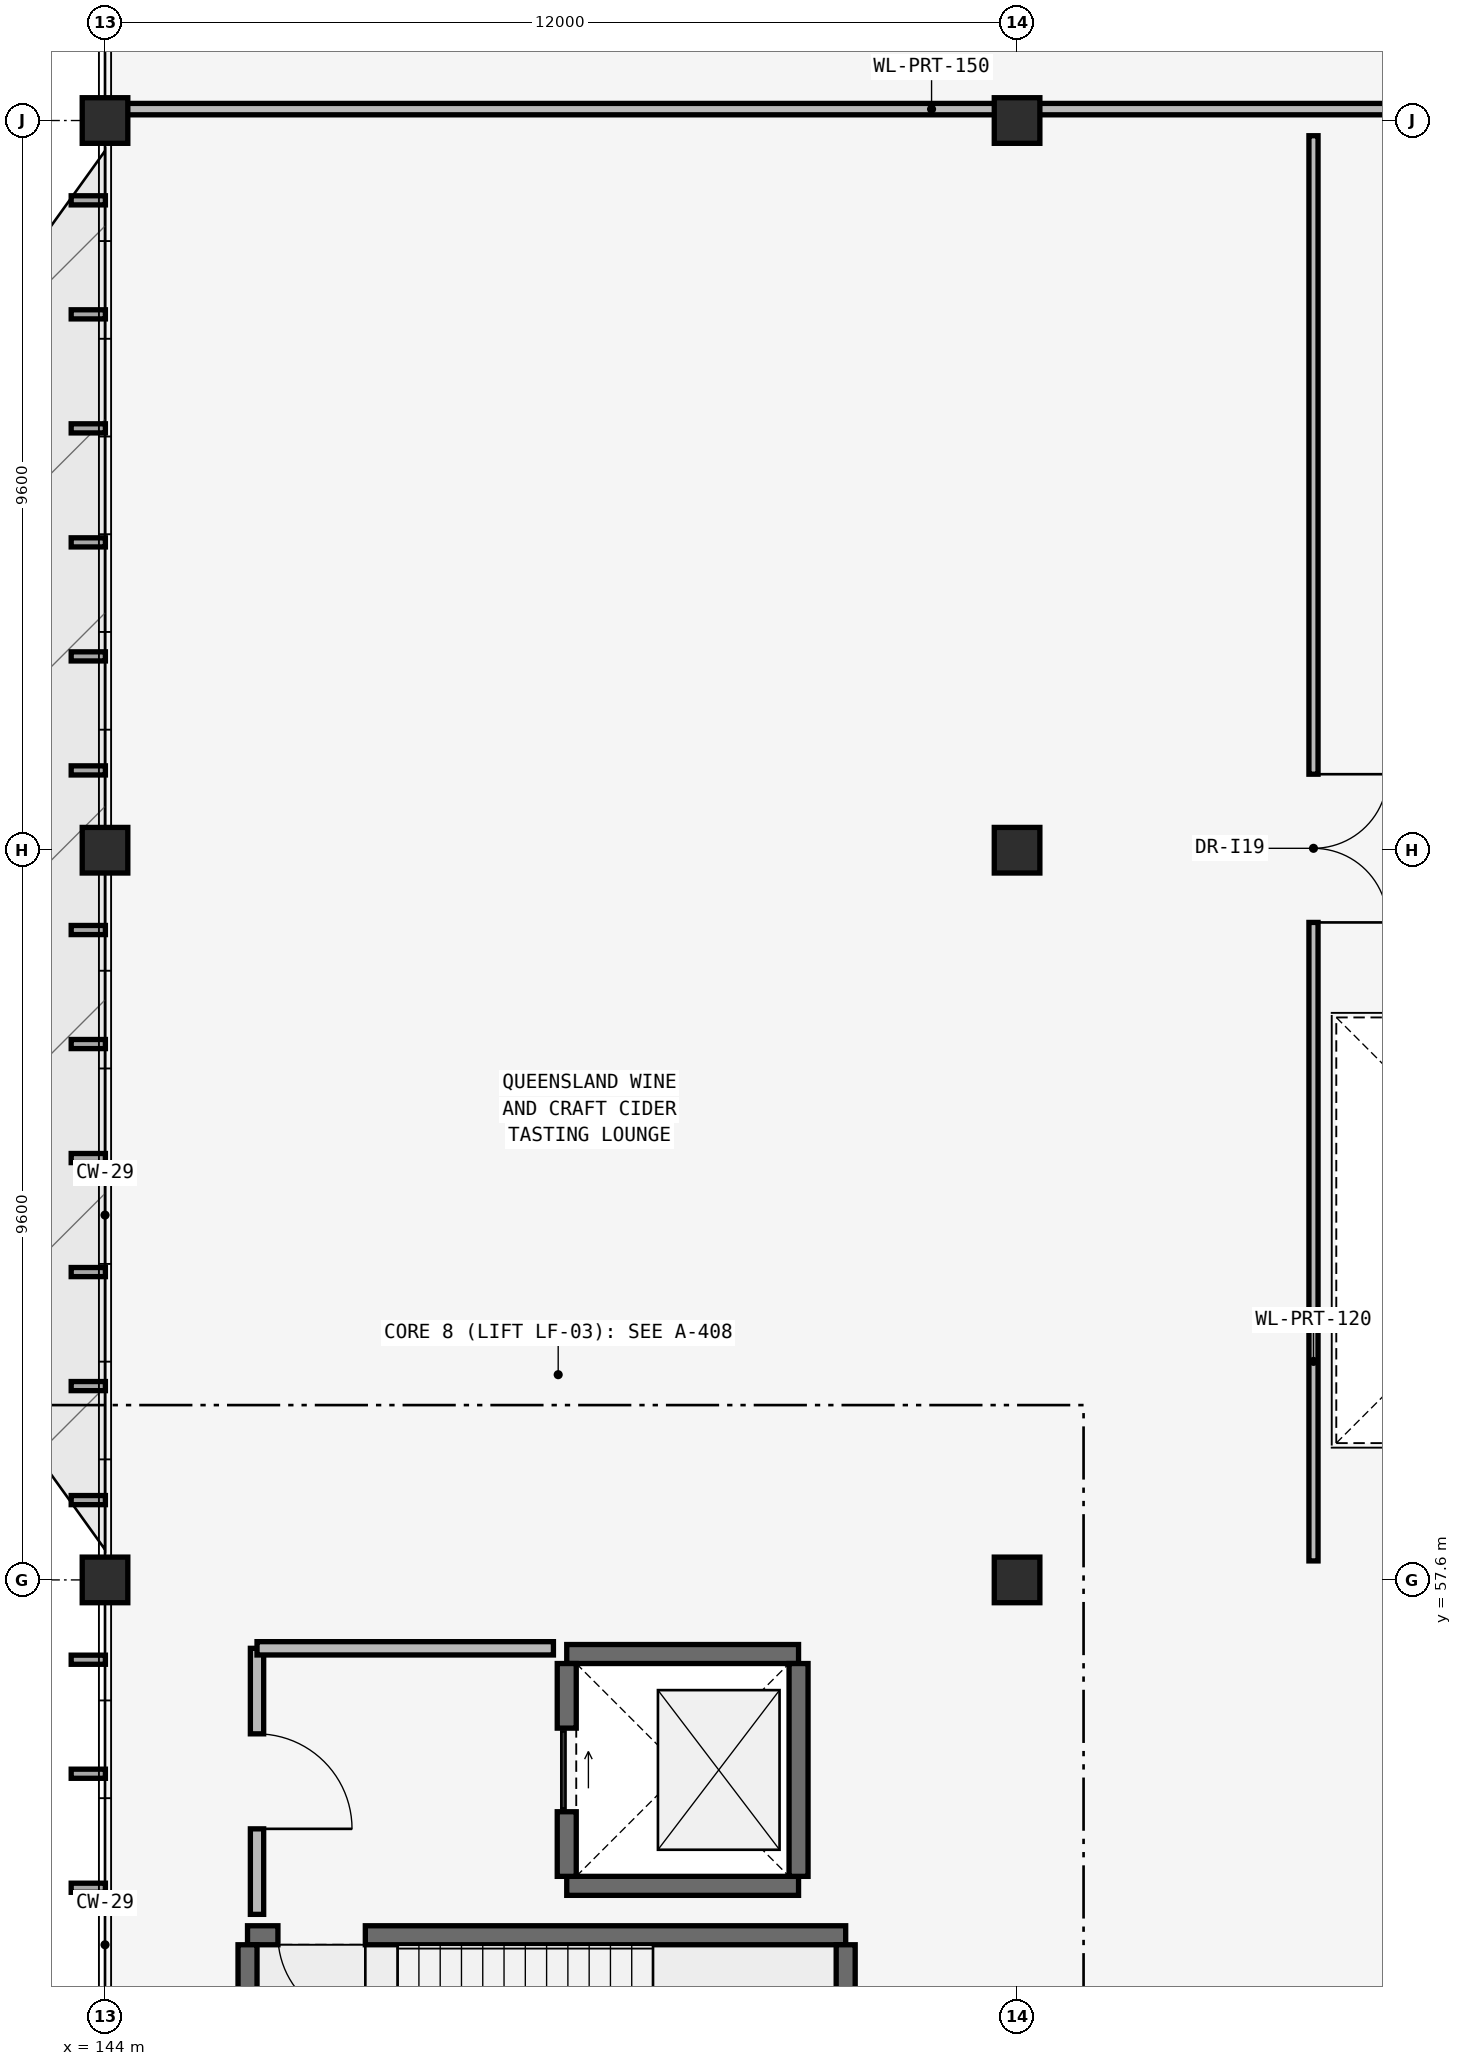
"""IFC4 building model, lengths in metres.
Left out: names, types, materials, properties, quantities, classifications, styles, units other than length and angle.
Written with IfcOpenShell. Run it as: python <this file> out.ifc"""

import sys

from ifc_helpers import new_model, si_unit, direction, frame, frame_2d, origin, origin_2d, place, context, subcontext, project, spatial, rectangle, extrude, element, fill, save


model = new_model("IFC4")
c1 = context("Model", 3, precision=1e-05, world=origin(), true_north=direction((0.0, 1.0)))
c2 = subcontext(c1, "Body", "Model", "MODEL_VIEW")
j1 = project(units=[si_unit("LENGTHUNIT", "METRE"), si_unit("PLANEANGLEUNIT", "RADIAN")], contexts=[c1])
p1 = place(None, origin())
s1 = spatial("IfcSite", under=j1, at=p1, CompositionType="ELEMENT")
p2 = place(p1, origin())
s2 = spatial("IfcBuilding", under=s1, at=p2, CompositionType="ELEMENT")
p3 = place(p2, frame((0.0, 0.0, 5.4)))
s3 = spatial("IfcBuildingStorey", under=s2, at=p3, CompositionType="ELEMENT", Elevation=5.4)
for number, where, z_axis, x_axis in (
    (1, (144.0, 57.6, 0.0), (0.0, 0.0, 1.0), (1.0, 0.0, 0.0)),
    (2, (144.0, 67.2, 0.0), (0.0, 0.0, 1.0), (1.0, 0.0, 0.0)),
    (3, (144.0, 76.8, 0.0), (0.0, 0.0, 1.0), (1.0, 0.0, 0.0)),
    (4, (156.0, 57.6, 0.0), (0.0, 0.0, 1.0), (1.0, 0.0, 0.0)),
    (5, (156.0, 67.2, 0.0), (0.0, 0.0, 1.0), (1.0, 0.0, 0.0)),
    (6, (156.0, 76.8, 0.0), (0.0, 0.0, 1.0), (1.0, 0.0, 0.0)),
):
    element("IfcColumn", number, at=place(p3, frame(where, z_axis=z_axis, x_axis=x_axis)), inside=s3, PredefinedType="COLUMN", context=c2, shape_type="SweptSolid", body=[
        extrude(rectangle(XDim=0.6, YDim=0.6, at=origin_2d()), origin(), (0.0, 0.0, 1.0), 4.8),
    ])
p4 = place(p3, frame((145.875, 52.925, 0.0), z_axis=(0.0, 0.0, 1.0), x_axis=(1.0, 0.0, 0.0)))
e7 = element("IfcWall", 7, at=p4, inside=s3, PredefinedType="SHEAR", context=c2, shape_type="SweptSolid", body=[
    extrude(rectangle(XDim=7.87, YDim=0.25, at=frame_2d((3.935, 0.0))), origin(), (0.0, 0.0, 1.0), 4.52),
])
p5 = place(p4, frame((0.4, 0.0, 0.0)))
e8 = element("IfcOpeningElement", 8, at=p5, cuts=e7, PredefinedType="OPENING", context=c2, shape_type="SweptSolid", body=[
    extrude(rectangle(XDim=1.15, YDim=2.15, at=frame_2d((0.575, 1.075))), frame((0.0, 0.14, 0.0), z_axis=(0.0, -1.0, 0.0), x_axis=(1.0, 0.0, 0.0)), (0.0, 0.0, 1.0), 0.28),
])
for number, where, z_axis, x_axis in (
    (9, (145.875, 48.9, 0.0), (0.0, 0.0, 1.0), (0.0, 1.0, 0.0)),
    (10, (153.745, 48.9, 0.0), (0.0, 0.0, 1.0), (0.0, 1.0, 0.0)),
):
    element("IfcWall", number, at=place(p3, frame(where, z_axis=z_axis, x_axis=x_axis)), inside=s3, PredefinedType="SHEAR", context=c2, shape_type="SweptSolid", body=[
        extrude(rectangle(XDim=3.9, YDim=0.25, at=frame_2d((1.95, 0.0))), origin(), (0.0, 0.0, 1.0), 4.52),
    ])
for number, where, z_axis, x_axis in (
    (11, (150.075, 53.575, 0.0), (0.0, 0.0, 1.0), (1.0, 0.0, 0.0)),
    (12, (150.075, 56.625, 0.0), (0.0, 0.0, 1.0), (1.0, 0.0, 0.0)),
):
    element("IfcWall", number, at=place(p3, frame(where, z_axis=z_axis, x_axis=x_axis)), inside=s3, PredefinedType="SHEAR", context=c2, shape_type="SweptSolid", body=[
        extrude(rectangle(XDim=3.05, YDim=0.25, at=frame_2d((1.525, 0.0))), origin(), (0.0, 0.0, 1.0), 4.52),
    ])
p6 = place(p3, frame((153.125, 53.7, 0.0), z_axis=(0.0, 0.0, 1.0), x_axis=(0.0, 1.0, 0.0)))
e13 = element("IfcWall", 13, at=p6, inside=s3, PredefinedType="SHEAR", context=c2, shape_type="SweptSolid", body=[
    extrude(rectangle(XDim=2.8, YDim=0.25, at=frame_2d((1.4, 0.0))), origin(), (0.0, 0.0, 1.0), 4.52),
])
p7 = place(p3, frame((150.075, 53.7, 0.0), z_axis=(0.0, 0.0, 1.0), x_axis=(0.0, 1.0, 0.0)))
e14 = element("IfcWall", 14, at=p7, inside=s3, PredefinedType="SHEAR", context=c2, shape_type="SweptSolid", body=[
    extrude(rectangle(XDim=2.8, YDim=0.25, at=frame_2d((1.4, 0.0))), origin(), (0.0, 0.0, 1.0), 4.52),
])
p8 = place(p7, frame((0.85, 0.0, 0.0)))
e15 = element("IfcOpeningElement", 15, at=p8, cuts=e14, PredefinedType="OPENING", context=c2, shape_type="SweptSolid", body=[
    extrude(rectangle(XDim=1.1, YDim=2.15, at=frame_2d((0.55, 1.075))), frame((0.0, 0.14, 0.0), z_axis=(0.0, -1.0, 0.0), x_axis=(1.0, 0.0, 0.0)), (0.0, 0.0, 1.0), 0.28),
])
p9 = place(p3, frame((146.0, 53.2, 0.0), z_axis=(0.0, 0.0, 1.0), x_axis=(0.0, 1.0, 0.0)))
e16 = element("IfcWall", 16, at=p9, inside=s3, PredefinedType="PARTITIONING", context=c2, shape_type="SweptSolid", body=[
    extrude(rectangle(XDim=3.5, YDim=0.175, at=frame_2d((1.75, 0.0))), origin(), (0.0, 0.0, 1.0), 4.52),
])
p10 = place(p9, frame((1.125, 0.0, 0.0)))
e17 = element("IfcOpeningElement", 17, at=p10, cuts=e16, PredefinedType="OPENING", context=c2, shape_type="SweptSolid", body=[
    extrude(rectangle(XDim=1.25, YDim=2.2, at=frame_2d((0.625, 1.1))), frame((0.0, 0.103, 0.0), z_axis=(0.0, -1.0, 0.0), x_axis=(1.0, 0.0, 0.0)), (0.0, 0.0, 1.0), 0.205),
])
p11 = place(p3, frame((146.0, 56.7, 0.0), z_axis=(0.0, 0.0, 1.0), x_axis=(1.0, 0.0, 0.0)))
e18 = element("IfcWall", 18, at=p11, inside=s3, PredefinedType="PARTITIONING", context=c2, shape_type="SweptSolid", body=[
    extrude(rectangle(XDim=3.9, YDim=0.175, at=frame_2d((1.95, 0.0))), origin(), (0.0, 0.0, 1.0), 4.52),
])
p12 = place(p3, frame((159.9, 57.85, 0.0), z_axis=(0.0, 0.0, 1.0), x_axis=(0.0, 1.0, 0.0)))
e19 = element("IfcWall", 19, at=p12, inside=s3, PredefinedType="PARTITIONING", context=c2, shape_type="SweptSolid", body=[
    extrude(rectangle(XDim=18.75, YDim=0.12, at=frame_2d((9.375, 0.0))), origin(), (0.0, 0.0, 1.0), 4.52),
])
p13 = place(p12, frame((8.4, 0.0, 0.0)))
e20 = element("IfcOpeningElement", 20, at=p13, cuts=e19, PredefinedType="OPENING", context=c2, shape_type="SweptSolid", body=[
    extrude(rectangle(XDim=1.95, YDim=2.32, at=frame_2d((0.975, 1.16))), frame((0.0, 0.075, 0.0), z_axis=(0.0, -1.0, 0.0), x_axis=(1.0, 0.0, 0.0)), (0.0, 0.0, 1.0), 0.15),
])
p14 = place(p3, frame((144.15, 76.95, 0.0), z_axis=(0.0, 0.0, 1.0), x_axis=(1.0, 0.0, 0.0)))
e21 = element("IfcWall", 21, at=p14, inside=s3, PredefinedType="PARTITIONING", context=c2, shape_type="SweptSolid", body=[
    extrude(rectangle(XDim=21.45, YDim=0.15, at=frame_2d((10.725, 0.0))), origin(), (0.0, 0.0, 1.0), 4.078),
])
p15 = place(p5, frame((1.15, 0.0, 0.0), z_axis=(0.0, 0.0, 1.0), x_axis=(-1.0, 0.0, 0.0)))
e22 = element("IfcDoor", 22, at=p15, inside=s3, OperationType="SINGLE_SWING_RIGHT", PredefinedType="DOOR", context=c2, shape_type="SweptSolid", body=[
    extrude(rectangle(XDim=1.15, YDim=2.15, at=frame_2d((0.575, 1.075))), frame((0.0, 0.025, 0.0), z_axis=(0.0, -1.0, 0.0), x_axis=(1.0, 0.0, 0.0)), (0.0, 0.0, 1.0), 0.05),
])
fill(e8, e22)
p16 = place(p8, origin())
e23 = element("IfcDoor", 23, at=p16, inside=s3, OperationType="SLIDING_TO_LEFT", PredefinedType="DOOR", context=c2, shape_type="SweptSolid", body=[
    extrude(rectangle(XDim=1.1, YDim=2.15, at=frame_2d((0.55, 1.075))), frame((0.0, 0.025, 0.0), z_axis=(0.0, -1.0, 0.0), x_axis=(1.0, 0.0, 0.0)), (0.0, 0.0, 1.0), 0.05),
])
fill(e15, e23)
p17 = place(p10, frame((1.25, 0.0, 0.0), z_axis=(0.0, 0.0, 1.0), x_axis=(-1.0, 0.0, 0.0)))
e24 = element("IfcDoor", 24, at=p17, inside=s3, OperationType="SINGLE_SWING_LEFT", PredefinedType="DOOR", context=c2, shape_type="SweptSolid", body=[
    extrude(rectangle(XDim=1.25, YDim=2.2, at=frame_2d((0.625, 1.1))), frame((0.0, 0.025, 0.0), z_axis=(0.0, -1.0, 0.0), x_axis=(1.0, 0.0, 0.0)), (0.0, 0.0, 1.0), 0.05),
])
fill(e17, e24)
p18 = place(p13, origin())
e25 = element("IfcDoor", 25, at=p18, inside=s3, OperationType="DOUBLE_DOOR_SINGLE_SWING", PredefinedType="DOOR", context=c2, shape_type="SweptSolid", body=[
    extrude(rectangle(XDim=1.95, YDim=2.32, at=frame_2d((0.975, 1.16))), frame((0.0, 0.025, 0.0), z_axis=(0.0, -1.0, 0.0), x_axis=(1.0, 0.0, 0.0)), (0.0, 0.0, 1.0), 0.05),
])
fill(e20, e25)
save(model, sys.argv[1])
